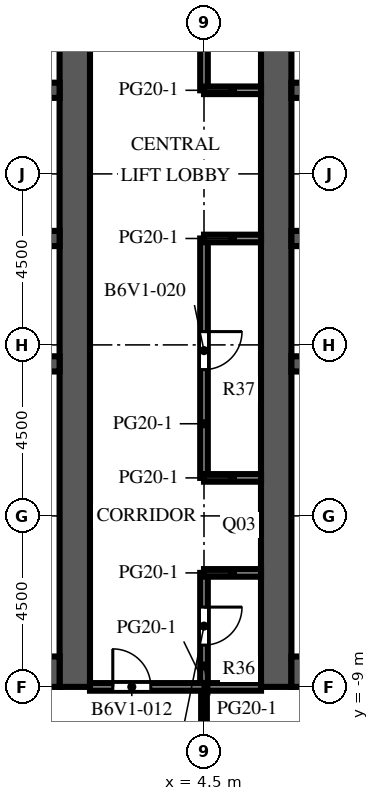
"""IFC4 building model, lengths in metres.
Left out: names, types, materials, properties, quantities, classifications, styles, units other than length and angle.
Written with IfcOpenShell. Run it as: python <this file> out.ifc"""

import sys

from ifc_helpers import new_model, si_unit, direction, frame, frame_2d, origin, place, context, subcontext, project, spatial, rectangle, extrude, element, fill, save


model = new_model("IFC4")
c1 = context("Model", 3, precision=1e-05, world=origin(), true_north=direction((0.0, 1.0)))
c2 = subcontext(c1, "Body", "Model", "MODEL_VIEW")
j1 = project(units=[si_unit("LENGTHUNIT", "METRE"), si_unit("PLANEANGLEUNIT", "RADIAN")], contexts=[c1])
p1 = place(None, origin())
s1 = spatial("IfcSite", under=j1, at=p1, CompositionType="ELEMENT")
p2 = place(p1, origin())
s2 = spatial("IfcBuilding", under=s1, at=p2, CompositionType="ELEMENT")
p3 = place(p2, frame((0.0, 0.0, 212.0)))
s3 = spatial("IfcBuildingStorey", under=s2, at=p3, CompositionType="ELEMENT", Elevation=212.0)
p4 = place(p3, frame((1.1, -9.0, 0.0), z_axis=(0.0, 0.0, 1.0), x_axis=(0.0, 1.0, 0.0)))
e1 = element("IfcWall", 1, at=p4, inside=s3, PredefinedType="SHEAR", context=c2, shape_type="SweptSolid", body=[
    extrude(rectangle(XDim=27.5, YDim=0.8, at=frame_2d((13.75, 0.0))), origin(), (0.0, 0.0, 1.0), 4.1),
])
p5 = place(p4, frame((12.55, 0.0, 0.0)))
e2 = element("IfcOpeningElement", 2, at=p5, cuts=e1, PredefinedType="OPENING", context=c2, shape_type="SweptSolid", body=[
    extrude(rectangle(XDim=2.4, YDim=2.4, at=frame_2d((1.2, 1.2))), frame((0.0, 0.41, 0.0), z_axis=(0.0, -1.0, 0.0), x_axis=(1.0, 0.0, 0.0)), (0.0, 0.0, 1.0), 0.82),
])
p6 = place(p4, frame((3.95, 0.0, 0.0)))
e3 = element("IfcOpeningElement", 3, at=p6, cuts=e1, PredefinedType="OPENING", context=c2, shape_type="SweptSolid", body=[
    extrude(rectangle(XDim=1.2, YDim=2.1, at=frame_2d((0.6, 1.05))), frame((0.0, 0.41, 0.0), z_axis=(0.0, -1.0, 0.0), x_axis=(1.0, 0.0, 0.0)), (0.0, 0.0, 1.0), 0.82),
])
p7 = place(p4, frame((22.35, 0.0, 0.0)))
e4 = element("IfcOpeningElement", 4, at=p7, cuts=e1, PredefinedType="OPENING", context=c2, shape_type="SweptSolid", body=[
    extrude(rectangle(XDim=1.2, YDim=2.1, at=frame_2d((0.6, 1.05))), frame((0.0, 0.41, 0.0), z_axis=(0.0, -1.0, 0.0), x_axis=(1.0, 0.0, 0.0)), (0.0, 0.0, 1.0), 0.82),
])
p8 = place(p3, frame((-9.7, -8.6, 0.0), z_axis=(0.0, 0.0, 1.0), x_axis=(1.0, 0.0, 0.0)))
e5 = element("IfcWall", 5, at=p8, inside=s3, PredefinedType="SHEAR", context=c2, shape_type="SweptSolid", body=[
    extrude(rectangle(XDim=10.4, YDim=0.8, at=frame_2d((5.2, 0.0))), origin(), (0.0, 0.0, 1.0), 4.1),
])
p9 = place(p3, frame((-9.7, -0.5, 0.0), z_axis=(0.0, 0.0, 1.0), x_axis=(1.0, 0.0, 0.0)))
e6 = element("IfcWall", 6, at=p9, inside=s3, PredefinedType="SHEAR", context=c2, shape_type="SweptSolid", body=[
    extrude(rectangle(XDim=10.4, YDim=0.4, at=frame_2d((5.2, 0.0))), origin(), (0.0, 0.0, 1.0), 4.1),
])
p10 = place(p3, frame((-9.7, 2.8, 0.0), z_axis=(0.0, 0.0, 1.0), x_axis=(1.0, 0.0, 0.0)))
e7 = element("IfcWall", 7, at=p10, inside=s3, PredefinedType="SHEAR", context=c2, shape_type="SweptSolid", body=[
    extrude(rectangle(XDim=10.4, YDim=0.4, at=frame_2d((5.2, 0.0))), origin(), (0.0, 0.0, 1.0), 4.1),
])
p11 = place(p10, frame((0.738, 0.0, 0.0)))
e8 = element("IfcOpeningElement", 8, at=p11, cuts=e7, PredefinedType="OPENING", context=c2, shape_type="SweptSolid", body=[
    extrude(rectangle(XDim=1.1, YDim=2.1, at=frame_2d((0.55, 1.05))), frame((0.0, 0.21, 0.0), z_axis=(0.0, -1.0, 0.0), x_axis=(1.0, 0.0, 0.0)), (0.0, 0.0, 1.0), 0.42),
])
p12 = place(p10, frame((3.337, 0.0, 0.0)))
e9 = element("IfcOpeningElement", 9, at=p12, cuts=e7, PredefinedType="OPENING", context=c2, shape_type="SweptSolid", body=[
    extrude(rectangle(XDim=1.1, YDim=2.1, at=frame_2d((0.55, 1.05))), frame((0.0, 0.21, 0.0), z_axis=(0.0, -1.0, 0.0), x_axis=(1.0, 0.0, 0.0)), (0.0, 0.0, 1.0), 0.42),
])
p13 = place(p10, frame((6.012, 0.0, 0.0)))
e10 = element("IfcOpeningElement", 10, at=p13, cuts=e7, PredefinedType="OPENING", context=c2, shape_type="SweptSolid", body=[
    extrude(rectangle(XDim=1.0, YDim=2.1, at=frame_2d((0.5, 1.05))), frame((0.0, 0.21, 0.0), z_axis=(0.0, -1.0, 0.0), x_axis=(1.0, 0.0, 0.0)), (0.0, 0.0, 1.0), 0.42),
])
p14 = place(p10, frame((8.613, 0.0, 0.0)))
e11 = element("IfcOpeningElement", 11, at=p14, cuts=e7, PredefinedType="OPENING", context=c2, shape_type="SweptSolid", body=[
    extrude(rectangle(XDim=1.0, YDim=2.1, at=frame_2d((0.5, 1.05))), frame((0.0, 0.21, 0.0), z_axis=(0.0, -1.0, 0.0), x_axis=(1.0, 0.0, 0.0)), (0.0, 0.0, 1.0), 0.42),
])
p15 = place(p3, frame((-9.7, 6.7, 0.0), z_axis=(0.0, 0.0, 1.0), x_axis=(1.0, 0.0, 0.0)))
e12 = element("IfcWall", 12, at=p15, inside=s3, PredefinedType="SHEAR", context=c2, shape_type="SweptSolid", body=[
    extrude(rectangle(XDim=10.4, YDim=0.4, at=frame_2d((5.2, 0.0))), origin(), (0.0, 0.0, 1.0), 4.1),
])
p16 = place(p15, frame((3.337, 0.0, 0.0)))
e13 = element("IfcOpeningElement", 13, at=p16, cuts=e12, PredefinedType="OPENING", context=c2, shape_type="SweptSolid", body=[
    extrude(rectangle(XDim=1.1, YDim=2.1, at=frame_2d((0.55, 1.05))), frame((0.0, 0.21, 0.0), z_axis=(0.0, -1.0, 0.0), x_axis=(1.0, 0.0, 0.0)), (0.0, 0.0, 1.0), 0.42),
])
p17 = place(p15, frame((5.962, 0.0, 0.0)))
e14 = element("IfcOpeningElement", 14, at=p17, cuts=e12, PredefinedType="OPENING", context=c2, shape_type="SweptSolid", body=[
    extrude(rectangle(XDim=1.1, YDim=2.1, at=frame_2d((0.55, 1.05))), frame((0.0, 0.21, 0.0), z_axis=(0.0, -1.0, 0.0), x_axis=(1.0, 0.0, 0.0)), (0.0, 0.0, 1.0), 0.42),
])
p18 = place(p15, frame((8.663, 0.0, 0.0)))
e15 = element("IfcOpeningElement", 15, at=p18, cuts=e12, PredefinedType="OPENING", context=c2, shape_type="SweptSolid", body=[
    extrude(rectangle(XDim=1.1, YDim=2.1, at=frame_2d((0.55, 1.05))), frame((0.0, 0.21, 0.0), z_axis=(0.0, -1.0, 0.0), x_axis=(1.0, 0.0, 0.0)), (0.0, 0.0, 1.0), 0.42),
])
p19 = place(p15, frame((0.688, 0.0, 0.0)))
e16 = element("IfcOpeningElement", 16, at=p19, cuts=e12, PredefinedType="OPENING", context=c2, shape_type="SweptSolid", body=[
    extrude(rectangle(XDim=1.0, YDim=2.1, at=frame_2d((0.5, 1.05))), frame((0.0, 0.21, 0.0), z_axis=(0.0, -1.0, 0.0), x_axis=(1.0, 0.0, 0.0)), (0.0, 0.0, 1.0), 0.42),
])
p20 = place(p3, frame((6.4, -9.0, 0.0), z_axis=(0.0, 0.0, 1.0), x_axis=(0.0, 1.0, 0.0)))
e17 = element("IfcWall", 17, at=p20, inside=s3, PredefinedType="SHEAR", context=c2, shape_type="SweptSolid", body=[
    extrude(rectangle(XDim=27.5, YDim=0.8, at=frame_2d((13.75, 0.0))), origin(), (0.0, 0.0, 1.0), 4.1),
])
p21 = place(p20, frame((12.55, 0.0, 0.0)))
e18 = element("IfcOpeningElement", 18, at=p21, cuts=e17, PredefinedType="OPENING", context=c2, shape_type="SweptSolid", body=[
    extrude(rectangle(XDim=2.4, YDim=2.4, at=frame_2d((1.2, 1.2))), frame((0.0, 0.41, 0.0), z_axis=(0.0, -1.0, 0.0), x_axis=(1.0, 0.0, 0.0)), (0.0, 0.0, 1.0), 0.82),
])
p22 = place(p20, frame((3.95, 0.0, 0.0)))
e19 = element("IfcOpeningElement", 19, at=p22, cuts=e17, PredefinedType="OPENING", context=c2, shape_type="SweptSolid", body=[
    extrude(rectangle(XDim=1.2, YDim=2.1, at=frame_2d((0.6, 1.05))), frame((0.0, 0.41, 0.0), z_axis=(0.0, -1.0, 0.0), x_axis=(1.0, 0.0, 0.0)), (0.0, 0.0, 1.0), 0.82),
])
p23 = place(p20, frame((22.35, 0.0, 0.0)))
e20 = element("IfcOpeningElement", 20, at=p23, cuts=e17, PredefinedType="OPENING", context=c2, shape_type="SweptSolid", body=[
    extrude(rectangle(XDim=1.2, YDim=2.1, at=frame_2d((0.6, 1.05))), frame((0.0, 0.41, 0.0), z_axis=(0.0, -1.0, 0.0), x_axis=(1.0, 0.0, 0.0)), (0.0, 0.0, 1.0), 0.82),
])
p24 = place(p3, frame((6.8, -8.6, 0.0), z_axis=(0.0, 0.0, 1.0), x_axis=(1.0, 0.0, 0.0)))
e21 = element("IfcWall", 21, at=p24, inside=s3, PredefinedType="SHEAR", context=c2, shape_type="SweptSolid", body=[
    extrude(rectangle(XDim=10.4, YDim=0.8, at=frame_2d((5.2, 0.0))), origin(), (0.0, 0.0, 1.0), 4.1),
])
p25 = place(p3, frame((6.8, -0.5, 0.0), z_axis=(0.0, 0.0, 1.0), x_axis=(1.0, 0.0, 0.0)))
e22 = element("IfcWall", 22, at=p25, inside=s3, PredefinedType="SHEAR", context=c2, shape_type="SweptSolid", body=[
    extrude(rectangle(XDim=10.4, YDim=0.4, at=frame_2d((5.2, 0.0))), origin(), (0.0, 0.0, 1.0), 4.1),
])
p26 = place(p3, frame((6.8, 2.8, 0.0), z_axis=(0.0, 0.0, 1.0), x_axis=(1.0, 0.0, 0.0)))
e23 = element("IfcWall", 23, at=p26, inside=s3, PredefinedType="SHEAR", context=c2, shape_type="SweptSolid", body=[
    extrude(rectangle(XDim=10.4, YDim=0.4, at=frame_2d((5.2, 0.0))), origin(), (0.0, 0.0, 1.0), 4.1),
])
p27 = place(p26, frame((0.738, 0.0, 0.0)))
e24 = element("IfcOpeningElement", 24, at=p27, cuts=e23, PredefinedType="OPENING", context=c2, shape_type="SweptSolid", body=[
    extrude(rectangle(XDim=1.1, YDim=2.1, at=frame_2d((0.55, 1.05))), frame((0.0, 0.21, 0.0), z_axis=(0.0, -1.0, 0.0), x_axis=(1.0, 0.0, 0.0)), (0.0, 0.0, 1.0), 0.42),
])
p28 = place(p26, frame((3.337, 0.0, 0.0)))
e25 = element("IfcOpeningElement", 25, at=p28, cuts=e23, PredefinedType="OPENING", context=c2, shape_type="SweptSolid", body=[
    extrude(rectangle(XDim=1.1, YDim=2.1, at=frame_2d((0.55, 1.05))), frame((0.0, 0.21, 0.0), z_axis=(0.0, -1.0, 0.0), x_axis=(1.0, 0.0, 0.0)), (0.0, 0.0, 1.0), 0.42),
])
p29 = place(p26, frame((6.012, 0.0, 0.0)))
e26 = element("IfcOpeningElement", 26, at=p29, cuts=e23, PredefinedType="OPENING", context=c2, shape_type="SweptSolid", body=[
    extrude(rectangle(XDim=1.0, YDim=2.1, at=frame_2d((0.5, 1.05))), frame((0.0, 0.21, 0.0), z_axis=(0.0, -1.0, 0.0), x_axis=(1.0, 0.0, 0.0)), (0.0, 0.0, 1.0), 0.42),
])
p30 = place(p26, frame((8.613, 0.0, 0.0)))
e27 = element("IfcOpeningElement", 27, at=p30, cuts=e23, PredefinedType="OPENING", context=c2, shape_type="SweptSolid", body=[
    extrude(rectangle(XDim=1.0, YDim=2.1, at=frame_2d((0.5, 1.05))), frame((0.0, 0.21, 0.0), z_axis=(0.0, -1.0, 0.0), x_axis=(1.0, 0.0, 0.0)), (0.0, 0.0, 1.0), 0.42),
])
p31 = place(p3, frame((6.8, 6.7, 0.0), z_axis=(0.0, 0.0, 1.0), x_axis=(1.0, 0.0, 0.0)))
e28 = element("IfcWall", 28, at=p31, inside=s3, PredefinedType="SHEAR", context=c2, shape_type="SweptSolid", body=[
    extrude(rectangle(XDim=10.4, YDim=0.4, at=frame_2d((5.2, 0.0))), origin(), (0.0, 0.0, 1.0), 4.1),
])
p32 = place(p31, frame((3.337, 0.0, 0.0)))
e29 = element("IfcOpeningElement", 29, at=p32, cuts=e28, PredefinedType="OPENING", context=c2, shape_type="SweptSolid", body=[
    extrude(rectangle(XDim=1.1, YDim=2.1, at=frame_2d((0.55, 1.05))), frame((0.0, 0.21, 0.0), z_axis=(0.0, -1.0, 0.0), x_axis=(1.0, 0.0, 0.0)), (0.0, 0.0, 1.0), 0.42),
])
p33 = place(p31, frame((5.962, 0.0, 0.0)))
e30 = element("IfcOpeningElement", 30, at=p33, cuts=e28, PredefinedType="OPENING", context=c2, shape_type="SweptSolid", body=[
    extrude(rectangle(XDim=1.1, YDim=2.1, at=frame_2d((0.55, 1.05))), frame((0.0, 0.21, 0.0), z_axis=(0.0, -1.0, 0.0), x_axis=(1.0, 0.0, 0.0)), (0.0, 0.0, 1.0), 0.42),
])
p34 = place(p31, frame((8.663, 0.0, 0.0)))
e31 = element("IfcOpeningElement", 31, at=p34, cuts=e28, PredefinedType="OPENING", context=c2, shape_type="SweptSolid", body=[
    extrude(rectangle(XDim=1.1, YDim=2.1, at=frame_2d((0.55, 1.05))), frame((0.0, 0.21, 0.0), z_axis=(0.0, -1.0, 0.0), x_axis=(1.0, 0.0, 0.0)), (0.0, 0.0, 1.0), 0.42),
])
p35 = place(p31, frame((0.688, 0.0, 0.0)))
e32 = element("IfcOpeningElement", 32, at=p35, cuts=e28, PredefinedType="OPENING", context=c2, shape_type="SweptSolid", body=[
    extrude(rectangle(XDim=1.0, YDim=2.1, at=frame_2d((0.5, 1.05))), frame((0.0, 0.21, 0.0), z_axis=(0.0, -1.0, 0.0), x_axis=(1.0, 0.0, 0.0)), (0.0, 0.0, 1.0), 0.42),
])
p36 = place(p3, frame((4.5, -9.0, 0.0), z_axis=(0.0, 0.0, 1.0), x_axis=(0.0, -1.0, 0.0)))
e33 = element("IfcWall", 33, at=p36, inside=s3, PredefinedType="PARTITIONING", context=c2, shape_type="SweptSolid", body=[
    extrude(rectangle(XDim=17.5, YDim=0.15, at=frame_2d((8.75, 0.0))), origin(), (0.0, 0.0, 1.0), 3.65),
])
p37 = place(p36, frame((3.45, 0.0, 0.0)))
e34 = element("IfcOpeningElement", 34, at=p37, cuts=e33, PredefinedType="OPENING", context=c2, shape_type="SweptSolid", body=[
    extrude(rectangle(XDim=1.0, YDim=2.1, at=frame_2d((0.5, 1.05))), frame((0.0, 0.085, 0.0), z_axis=(0.0, -1.0, 0.0), x_axis=(1.0, 0.0, 0.0)), (0.0, 0.0, 1.0), 0.17),
])
p38 = place(p3, frame((4.5, -6.0, 0.0), z_axis=(0.0, 0.0, 1.0), x_axis=(0.0, -1.0, 0.0)))
e35 = element("IfcWall", 35, at=p38, inside=s3, PredefinedType="PARTITIONING", context=c2, shape_type="SweptSolid", body=[
    extrude(rectangle(XDim=3.0, YDim=0.2, at=frame_2d((1.5, 0.0))), origin(), (0.0, 0.0, 1.0), 3.65),
])
p39 = place(p38, frame((0.9, 0.0, 0.0)))
e36 = element("IfcOpeningElement", 36, at=p39, cuts=e35, PredefinedType="OPENING", context=c2, shape_type="SweptSolid", body=[
    extrude(rectangle(XDim=1.0, YDim=2.1, at=frame_2d((0.5, 1.05))), frame((0.0, 0.11, 0.0), z_axis=(0.0, -1.0, 0.0), x_axis=(1.0, 0.0, 0.0)), (0.0, 0.0, 1.0), 0.22),
])
p40 = place(p3, frame((4.5, 2.8, 0.0), z_axis=(0.0, 0.0, 1.0), x_axis=(0.0, -1.0, 0.0)))
e37 = element("IfcWall", 37, at=p40, inside=s3, PredefinedType="PARTITIONING", context=c2, shape_type="SweptSolid", body=[
    extrude(rectangle(XDim=6.3, YDim=0.2, at=frame_2d((3.15, 0.0))), origin(), (0.0, 0.0, 1.0), 3.65),
])
p41 = place(p40, frame((2.45, 0.0, 0.0)))
e38 = element("IfcOpeningElement", 38, at=p41, cuts=e37, PredefinedType="OPENING", context=c2, shape_type="SweptSolid", body=[
    extrude(rectangle(XDim=1.0, YDim=2.1, at=frame_2d((0.5, 1.05))), frame((0.0, 0.11, 0.0), z_axis=(0.0, -1.0, 0.0), x_axis=(1.0, 0.0, 0.0)), (0.0, 0.0, 1.0), 0.22),
])
p42 = place(p3, frame((4.5, 18.5, 0.0), z_axis=(0.0, 0.0, 1.0), x_axis=(0.0, -1.0, 0.0)))
e39 = element("IfcWall", 39, at=p42, inside=s3, PredefinedType="PARTITIONING", context=c2, shape_type="SweptSolid", body=[
    extrude(rectangle(XDim=11.8, YDim=0.2, at=frame_2d((5.9, 0.0))), origin(), (0.0, 0.0, 1.0), 3.65),
])
p43 = place(p42, frame((6.45, 0.0, 0.0)))
e40 = element("IfcOpeningElement", 40, at=p43, cuts=e39, PredefinedType="OPENING", context=c2, shape_type="SweptSolid", body=[
    extrude(rectangle(XDim=1.0, YDim=2.1, at=frame_2d((0.5, 1.05))), frame((0.0, 0.11, 0.0), z_axis=(0.0, -1.0, 0.0), x_axis=(1.0, 0.0, 0.0)), (0.0, 0.0, 1.0), 0.22),
])
p44 = place(p3, frame((6.0, -9.0, 0.0), z_axis=(0.0, 0.0, 1.0), x_axis=(-1.0, 0.0, 0.0)))
e41 = element("IfcWall", 41, at=p44, inside=s3, PredefinedType="PARTITIONING", context=c2, shape_type="SweptSolid", body=[
    extrude(rectangle(XDim=4.5, YDim=0.2, at=frame_2d((2.25, 0.0))), origin(), (0.0, 0.0, 1.0), 3.65),
])
p45 = place(p44, frame((2.9, 0.0, 0.0)))
e42 = element("IfcOpeningElement", 42, at=p45, cuts=e41, PredefinedType="OPENING", context=c2, shape_type="SweptSolid", body=[
    extrude(rectangle(XDim=1.0, YDim=2.1, at=frame_2d((0.5, 1.05))), frame((0.0, 0.11, 0.0), z_axis=(0.0, -1.0, 0.0), x_axis=(1.0, 0.0, 0.0)), (0.0, 0.0, 1.0), 0.22),
])
for number, where, z_axis, x_axis in (
    (43, (4.5, -6.0, 0.0), (0.0, 0.0, 1.0), (1.0, 0.0, 0.0)),
    (44, (4.5, -3.5, 0.0), (0.0, 0.0, 1.0), (1.0, 0.0, 0.0)),
    (45, (4.5, 2.8, 0.0), (0.0, 0.0, 1.0), (1.0, 0.0, 0.0)),
    (46, (4.5, 6.7, 0.0), (0.0, 0.0, 1.0), (1.0, 0.0, 0.0)),
):
    element("IfcWall", number, at=place(p3, frame(where, z_axis=z_axis, x_axis=x_axis)), inside=s3, PredefinedType="PARTITIONING", context=c2, shape_type="SweptSolid", body=[
        extrude(rectangle(XDim=1.5, YDim=0.2, at=frame_2d((0.75, 0.0))), origin(), (0.0, 0.0, 1.0), 3.65),
    ])
p46 = place(p5, origin())
e47 = element("IfcDoor", 47, at=p46, inside=s3, OperationType="DOUBLE_DOOR_DOUBLE_SWING", PredefinedType="DOOR", context=c2, shape_type="SweptSolid", body=[
    extrude(rectangle(XDim=2.4, YDim=2.4, at=frame_2d((1.2, 1.2))), frame((0.0, 0.025, 0.0), z_axis=(0.0, -1.0, 0.0), x_axis=(1.0, 0.0, 0.0)), (0.0, 0.0, 1.0), 0.05),
])
fill(e2, e47)
p47 = place(p21, origin())
e48 = element("IfcDoor", 48, at=p47, inside=s3, OperationType="DOUBLE_DOOR_DOUBLE_SWING", PredefinedType="DOOR", context=c2, shape_type="SweptSolid", body=[
    extrude(rectangle(XDim=2.4, YDim=2.4, at=frame_2d((1.2, 1.2))), frame((0.0, 0.025, 0.0), z_axis=(0.0, -1.0, 0.0), x_axis=(1.0, 0.0, 0.0)), (0.0, 0.0, 1.0), 0.05),
])
fill(e18, e48)
p48 = place(p6, origin())
e49 = element("IfcDoor", 49, at=p48, inside=s3, OperationType="SINGLE_SWING_LEFT", PredefinedType="DOOR", context=c2, shape_type="SweptSolid", body=[
    extrude(rectangle(XDim=1.2, YDim=2.1, at=frame_2d((0.6, 1.05))), frame((0.0, 0.375, 0.0), z_axis=(0.0, -1.0, 0.0), x_axis=(1.0, 0.0, 0.0)), (0.0, 0.0, 1.0), 0.05),
])
fill(e3, e49)
p49 = place(p22, origin())
e50 = element("IfcDoor", 50, at=p49, inside=s3, OperationType="SINGLE_SWING_RIGHT", PredefinedType="DOOR", context=c2, shape_type="SweptSolid", body=[
    extrude(rectangle(XDim=1.2, YDim=2.1, at=frame_2d((0.6, 1.05))), frame((0.0, -0.325, 0.0), z_axis=(0.0, -1.0, 0.0), x_axis=(1.0, 0.0, 0.0)), (0.0, 0.0, 1.0), 0.05),
])
fill(e19, e50)
p50 = place(p45, origin())
e51 = element("IfcDoor", 51, at=p50, inside=s3, OperationType="SINGLE_SWING_RIGHT", PredefinedType="DOOR", context=c2, shape_type="SweptSolid", body=[
    extrude(rectangle(XDim=1.0, YDim=2.1, at=frame_2d((0.5, 1.05))), frame((0.0, 0.025, 0.0), z_axis=(0.0, -1.0, 0.0), x_axis=(1.0, 0.0, 0.0)), (0.0, 0.0, 1.0), 0.05),
])
fill(e42, e51)
p51 = place(p39, origin())
e52 = element("IfcDoor", 52, at=p51, inside=s3, OperationType="SINGLE_SWING_LEFT", PredefinedType="DOOR", context=c2, shape_type="SweptSolid", body=[
    extrude(rectangle(XDim=1.0, YDim=2.1, at=frame_2d((0.5, 1.05))), frame((0.0, 0.025, 0.0), z_axis=(0.0, -1.0, 0.0), x_axis=(1.0, 0.0, 0.0)), (0.0, 0.0, 1.0), 0.05),
])
fill(e36, e52)
p52 = place(p41, origin())
e53 = element("IfcDoor", 53, at=p52, inside=s3, OperationType="SINGLE_SWING_LEFT", PredefinedType="DOOR", context=c2, shape_type="SweptSolid", body=[
    extrude(rectangle(XDim=1.0, YDim=2.1, at=frame_2d((0.5, 1.05))), frame((0.0, 0.025, 0.0), z_axis=(0.0, -1.0, 0.0), x_axis=(1.0, 0.0, 0.0)), (0.0, 0.0, 1.0), 0.05),
])
fill(e38, e53)
save(model, sys.argv[1])
